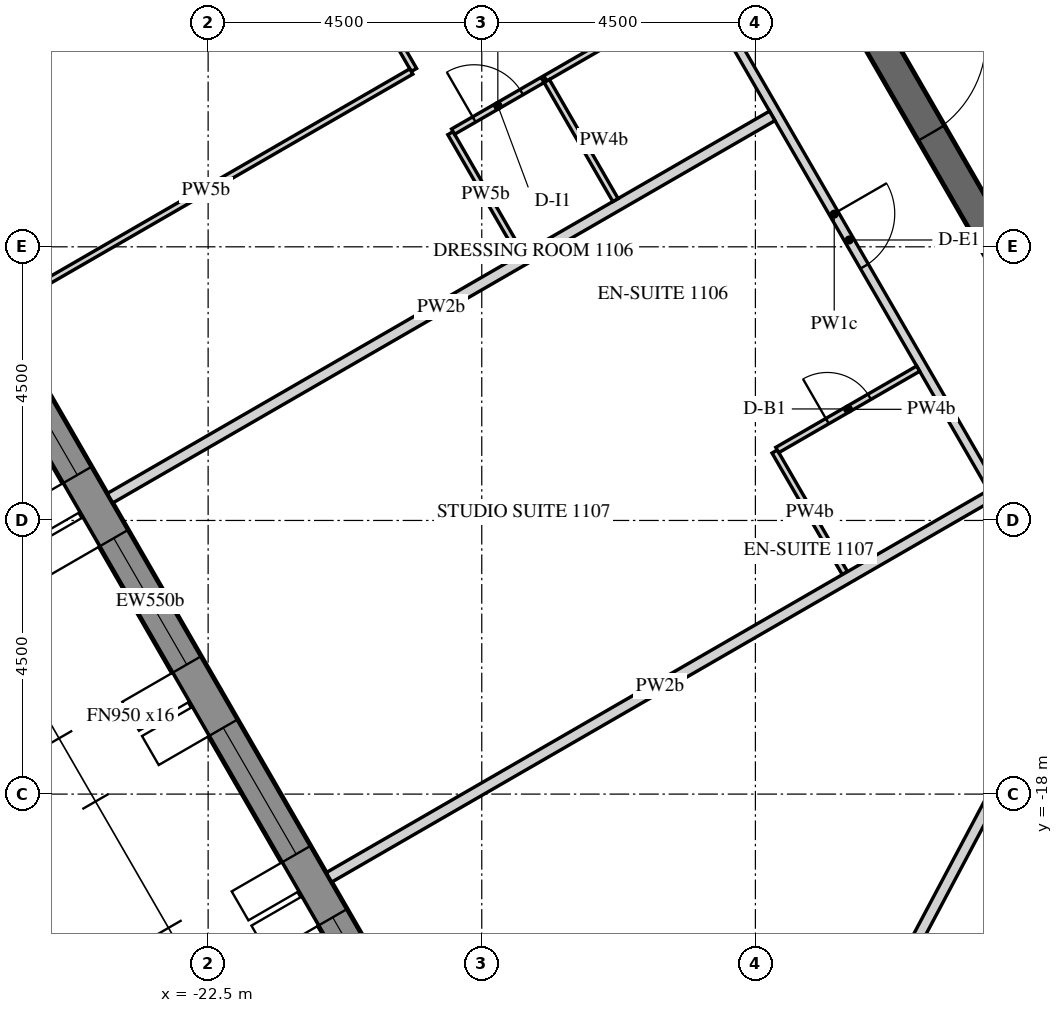
"""IFC4 building model, lengths in metres.
Left out: names, types, materials, properties, quantities, classifications, styles, units other than length and angle.
Written with IfcOpenShell. Run it as: python <this file> out.ifc"""

import sys

from ifc_helpers import new_model, si_unit, direction, frame, frame_2d, origin, place, context, subcontext, project, spatial, polyline, rectangle, outline, extrude, element, fill, save


model = new_model("IFC4")
c1 = context("Model", 3, precision=1e-05, world=origin(), true_north=direction((0.0, 1.0)))
c2 = subcontext(c1, "Body", "Model", "MODEL_VIEW")
j1 = project(units=[si_unit("LENGTHUNIT", "METRE"), si_unit("PLANEANGLEUNIT", "RADIAN")], contexts=[c1])
p1 = place(None, origin())
s1 = spatial("IfcSite", under=j1, at=p1, CompositionType="ELEMENT")
p2 = place(p1, origin())
s2 = spatial("IfcBuilding", under=s1, at=p2, CompositionType="ELEMENT")
p3 = place(p2, frame((0.0, 0.0, 152.7)))
s3 = spatial("IfcBuildingStorey", under=s2, at=p3, CompositionType="ELEMENT", Elevation=152.7)
p4 = place(p3, frame((-30.391, -2.811, 0.0), z_axis=(0.0, 0.0, 1.0), x_axis=(0.499998569178, -0.866026229868, 0.0)))
e1 = element("IfcWall", 1, at=p4, inside=s3, PredefinedType="SOLIDWALL", context=c2, shape_type="SweptSolid", body=[
    extrude(outline(polyline([(-0.022, -0.275), (27.783, -0.275), (27.732, 0.275), (0.022, 0.275), (-0.022, -0.275)])), origin(), (0.0, 0.0, 1.0), 3.75),
])
p5 = place(p4, frame((1.879, 0.0, 0.9)))
e2 = element("IfcOpeningElement", 2, at=p5, cuts=e1, PredefinedType="OPENING", context=c2, shape_type="SweptSolid", body=[
    extrude(rectangle(XDim=2.4, YDim=2.4, at=frame_2d((1.2, 1.2))), frame((0.0, 0.285, 0.0), z_axis=(0.0, -1.0, 0.0), x_axis=(1.0, 0.0, 0.0)), (0.0, 0.0, 1.0), 0.57),
])
p6 = place(p4, frame((5.479, 0.0, 0.9)))
e3 = element("IfcOpeningElement", 3, at=p6, cuts=e1, PredefinedType="OPENING", context=c2, shape_type="SweptSolid", body=[
    extrude(rectangle(XDim=2.4, YDim=2.4, at=frame_2d((1.2, 1.2))), frame((0.0, 0.285, 0.0), z_axis=(0.0, -1.0, 0.0), x_axis=(1.0, 0.0, 0.0)), (0.0, 0.0, 1.0), 0.57),
])
p7 = place(p4, frame((9.079, 0.0, 0.9)))
e4 = element("IfcOpeningElement", 4, at=p7, cuts=e1, PredefinedType="OPENING", context=c2, shape_type="SweptSolid", body=[
    extrude(rectangle(XDim=2.4, YDim=2.4, at=frame_2d((1.2, 1.2))), frame((0.0, 0.285, 0.0), z_axis=(0.0, -1.0, 0.0), x_axis=(1.0, 0.0, 0.0)), (0.0, 0.0, 1.0), 0.57),
])
p8 = place(p4, frame((12.679, 0.0, 0.9)))
e5 = element("IfcOpeningElement", 5, at=p8, cuts=e1, PredefinedType="OPENING", context=c2, shape_type="SweptSolid", body=[
    extrude(rectangle(XDim=2.4, YDim=2.4, at=frame_2d((1.2, 1.2))), frame((0.0, 0.285, 0.0), z_axis=(0.0, -1.0, 0.0), x_axis=(1.0, 0.0, 0.0)), (0.0, 0.0, 1.0), 0.57),
])
p9 = place(p4, frame((16.279, 0.0, 0.9)))
e6 = element("IfcOpeningElement", 6, at=p9, cuts=e1, PredefinedType="OPENING", context=c2, shape_type="SweptSolid", body=[
    extrude(rectangle(XDim=2.4, YDim=2.4, at=frame_2d((1.2, 1.2))), frame((0.0, 0.285, 0.0), z_axis=(0.0, -1.0, 0.0), x_axis=(1.0, 0.0, 0.0)), (0.0, 0.0, 1.0), 0.57),
])
p10 = place(p4, frame((19.879, 0.0, 0.9)))
e7 = element("IfcOpeningElement", 7, at=p10, cuts=e1, PredefinedType="OPENING", context=c2, shape_type="SweptSolid", body=[
    extrude(rectangle(XDim=2.4, YDim=2.4, at=frame_2d((1.2, 1.2))), frame((0.0, 0.285, 0.0), z_axis=(0.0, -1.0, 0.0), x_axis=(1.0, 0.0, 0.0)), (0.0, 0.0, 1.0), 0.57),
])
p11 = place(p4, frame((23.479, 0.0, 0.9)))
e8 = element("IfcOpeningElement", 8, at=p11, cuts=e1, PredefinedType="OPENING", context=c2, shape_type="SweptSolid", body=[
    extrude(rectangle(XDim=2.4, YDim=2.4, at=frame_2d((1.2, 1.2))), frame((0.0, 0.285, 0.0), z_axis=(0.0, -1.0, 0.0), x_axis=(1.0, 0.0, 0.0)), (0.0, 0.0, 1.0), 0.57),
])
p12 = place(p3, frame((-14.722, 0.0, 0.0), z_axis=(0.0, 0.0, 1.0), x_axis=(0.50000571537, -0.866022103989, 0.0)))
e9 = element("IfcWall", 9, at=p12, inside=s3, PredefinedType="SHEAR", context=c2, shape_type="SweptSolid", body=[
    extrude(outline(polyline([(-0.144, -0.25), (14.867, -0.25), (14.578, 0.25), (0.144, 0.25), (-0.144, -0.25)])), origin(), (0.0, 0.0, 1.0), 3.75),
])
p13 = place(p12, frame((6.432, 0.0, 0.0)))
e10 = element("IfcOpeningElement", 10, at=p13, cuts=e9, PredefinedType="OPENING", context=c2, shape_type="SweptSolid", body=[
    extrude(rectangle(XDim=1.8, YDim=2.4, at=frame_2d((0.9, 1.2))), frame((0.0, 0.26, 0.0), z_axis=(0.0, -1.0, 0.0), x_axis=(1.0, 0.0, 0.0)), (0.0, 0.0, 1.0), 0.52),
])
p14 = place(p3, frame((-11.345, 0.0, 0.0), z_axis=(0.0, 0.0, 1.0), x_axis=(0.499995046907, -0.866028263435, 0.0)))
e11 = element("IfcWall", 11, at=p14, inside=s3, PredefinedType="SHEAR", context=c2, shape_type="SweptSolid", body=[
    extrude(outline(polyline([(-0.101, -0.175), (11.446, -0.175), (11.244, 0.175), (0.101, 0.175), (-0.101, -0.175)])), origin(), (0.0, 0.0, 1.0), 3.75),
])
p15 = place(p14, frame((4.744, 0.0, 0.0)))
e12 = element("IfcOpeningElement", 12, at=p15, cuts=e11, PredefinedType="OPENING", context=c2, shape_type="SweptSolid", body=[
    extrude(rectangle(XDim=1.8, YDim=2.4, at=frame_2d((0.9, 1.2))), frame((0.0, 0.185, 0.0), z_axis=(0.0, -1.0, 0.0), x_axis=(1.0, 0.0, 0.0)), (0.0, 0.0, 1.0), 0.37),
])
p16 = place(p3, frame((-15.863, -2.125, 0.0), z_axis=(0.0, 0.0, 1.0), x_axis=(0.500008833422, -0.866020303746, 0.0)))
e13 = element("IfcWall", 13, at=p16, inside=s3, PredefinedType="PARTITIONING", context=c2, shape_type="SweptSolid", body=[
    extrude(rectangle(XDim=14.636, YDim=0.15, at=frame_2d((7.318, 0.0))), origin(), (0.0, 0.0, 1.0), 2.823),
])
p17 = place(p16, frame((0.961, 0.0, 0.0)))
e14 = element("IfcOpeningElement", 14, at=p17, cuts=e13, PredefinedType="OPENING", context=c2, shape_type="SweptSolid", body=[
    extrude(rectangle(XDim=1.0, YDim=2.1, at=frame_2d((0.5, 1.05))), frame((0.0, 0.085, 0.0), z_axis=(0.0, -1.0, 0.0), x_axis=(1.0, 0.0, 0.0)), (0.0, 0.0, 1.0), 0.17),
])
p18 = place(p16, frame((7.309, 0.0, 0.0)))
e15 = element("IfcOpeningElement", 15, at=p18, cuts=e13, PredefinedType="OPENING", context=c2, shape_type="SweptSolid", body=[
    extrude(rectangle(XDim=1.0, YDim=2.1, at=frame_2d((0.5, 1.05))), frame((0.0, 0.085, 0.0), z_axis=(0.0, -1.0, 0.0), x_axis=(1.0, 0.0, 0.0)), (0.0, 0.0, 1.0), 0.17),
])
p19 = place(p16, frame((13.486, 0.0, 0.0)))
e16 = element("IfcOpeningElement", 16, at=p19, cuts=e13, PredefinedType="OPENING", context=c2, shape_type="SweptSolid", body=[
    extrude(rectangle(XDim=1.0, YDim=2.1, at=frame_2d((0.5, 1.05))), frame((0.0, 0.085, 0.0), z_axis=(0.0, -1.0, 0.0), x_axis=(1.0, 0.0, 0.0)), (0.0, 0.0, 1.0), 0.17),
])
p20 = place(p3, frame((-16.956, -6.231, 0.0), z_axis=(0.0, 0.0, 1.0), x_axis=(0.866046596414, 0.499963291492, 0.0)))
e17 = element("IfcWall", 17, at=p20, inside=s3, PredefinedType="PARTITIONING", context=c2, shape_type="SweptSolid", body=[
    extrude(rectangle(XDim=2.925, YDim=0.1, at=frame_2d((1.462, 0.0))), origin(), (0.0, 0.0, 1.0), 2.823),
])
p21 = place(p20, frame((1.1, 0.0, 0.0)))
e18 = element("IfcOpeningElement", 18, at=p21, cuts=e17, PredefinedType="OPENING", context=c2, shape_type="SweptSolid", body=[
    extrude(rectangle(XDim=0.8, YDim=2.1, at=frame_2d((0.4, 1.05))), frame((0.0, 0.06, 0.0), z_axis=(0.0, -1.0, 0.0), x_axis=(1.0, 0.0, 0.0)), (0.0, 0.0, 1.0), 0.12),
])
p22 = place(p3, frame((-17.36, -9.131, 0.0), z_axis=(0.0, 0.0, 1.0), x_axis=(-0.500015210774, 0.866016621662, 0.0)))
e19 = element("IfcWall", 19, at=p22, inside=s3, PredefinedType="PARTITIONING", context=c2, shape_type="SweptSolid", body=[
    extrude(rectangle(XDim=2.31, YDim=0.1, at=frame_2d((1.155, 0.0))), origin(), (0.0, 0.0, 1.0), 2.823),
])
p23 = place(p3, frame((-18.472, -7.106, 0.0), z_axis=(0.0, 0.0, 1.0), x_axis=(0.866087547558, 0.499892348375, 0.0)))
e20 = element("IfcWall", 20, at=p23, inside=s3, PredefinedType="PARTITIONING", context=c2, shape_type="SweptSolid", body=[
    extrude(rectangle(XDim=1.7, YDim=0.1, at=frame_2d((0.85, 0.0))), origin(), (0.0, 0.0, 1.0), 2.823),
])
p24 = place(p23, frame((0.4, 0.0, 0.0)))
e21 = element("IfcOpeningElement", 21, at=p24, cuts=e20, PredefinedType="OPENING", context=c2, shape_type="SweptSolid", body=[
    extrude(rectangle(XDim=0.9, YDim=2.1, at=frame_2d((0.45, 1.05))), frame((0.0, 0.06, 0.0), z_axis=(0.0, -1.0, 0.0), x_axis=(1.0, 0.0, 0.0)), (0.0, 0.0, 1.0), 0.12),
])
p25 = place(p3, frame((-21.405, -2.125, 0.0), z_axis=(0.0, 0.0, 1.0), x_axis=(0.49999161165, -0.866030246746, 0.0)))
e22 = element("IfcWall", 22, at=p25, inside=s3, PredefinedType="PARTITIONING", context=c2, shape_type="SweptSolid", body=[
    extrude(rectangle(XDim=4.58, YDim=0.1, at=frame_2d((2.29, 0.0))), origin(), (0.0, 0.0, 1.0), 2.823),
])
p26 = place(p25, frame((0.53, 0.0, 0.0)))
e23 = element("IfcOpeningElement", 23, at=p26, cuts=e22, PredefinedType="OPENING", context=c2, shape_type="SweptSolid", body=[
    extrude(rectangle(XDim=0.9, YDim=2.1, at=frame_2d((0.45, 1.05))), frame((0.0, 0.06, 0.0), z_axis=(0.0, -1.0, 0.0), x_axis=(1.0, 0.0, 0.0)), (0.0, 0.0, 1.0), 0.12),
])
p27 = place(p3, frame((-19.158, -6.116, 0.0), z_axis=(0.0, 0.0, 1.0), x_axis=(-0.866021400173, -0.500006934395, 0.0)))
e24 = element("IfcWall", 24, at=p27, inside=s3, PredefinedType="PARTITIONING", context=c2, shape_type="SweptSolid", body=[
    extrude(rectangle(XDim=7.8, YDim=0.1, at=frame_2d((3.9, 0.0))), origin(), (0.0, 0.0, 1.0), 2.823),
])
p28 = place(p3, frame((-24.114, -13.134, 0.0), z_axis=(0.0, 0.0, 1.0), x_axis=(0.866024255907, 0.500001988177, 0.0)))
e25 = element("IfcWall", 25, at=p28, inside=s3, PredefinedType="PARTITIONING", context=c2, shape_type="SweptSolid", body=[
    extrude(rectangle(XDim=12.575, YDim=0.18, at=frame_2d((6.288, 0.0))), origin(), (0.0, 0.0, 1.0), 2.823),
])
p29 = place(p3, frame((-16.931, -6.274, 0.0), z_axis=(0.0, 0.0, 1.0), x_axis=(0.500077800282, -0.865980481111, 0.0)))
e26 = element("IfcWall", 26, at=p29, inside=s3, PredefinedType="PARTITIONING", context=c2, shape_type="SweptSolid", body=[
    extrude(rectangle(XDim=2.26, YDim=0.1, at=frame_2d((1.13, 0.0))), origin(), (0.0, 0.0, 1.0), 2.823),
])
p30 = place(p3, frame((-12.028, -14.367, 0.0), z_axis=(0.0, 0.0, 1.0), x_axis=(-0.500015210774, 0.866016621662, 0.0)))
e27 = element("IfcWall", 27, at=p30, inside=s3, PredefinedType="PARTITIONING", context=c2, shape_type="SweptSolid", body=[
    extrude(rectangle(XDim=2.31, YDim=0.1, at=frame_2d((1.155, 0.0))), origin(), (0.0, 0.0, 1.0), 2.823),
])
p31 = place(p3, frame((-13.14, -12.341, 0.0), z_axis=(0.0, 0.0, 1.0), x_axis=(0.86604424267, 0.499967368674, 0.0)))
e28 = element("IfcWall", 28, at=p31, inside=s3, PredefinedType="PARTITIONING", context=c2, shape_type="SweptSolid", body=[
    extrude(rectangle(XDim=2.675, YDim=0.1, at=frame_2d((1.337, 0.0))), origin(), (0.0, 0.0, 1.0), 2.823),
])
p32 = place(p31, frame((0.95, 0.0, 0.0)))
e29 = element("IfcOpeningElement", 29, at=p32, cuts=e28, PredefinedType="OPENING", context=c2, shape_type="SweptSolid", body=[
    extrude(rectangle(XDim=0.8, YDim=2.1, at=frame_2d((0.4, 1.05))), frame((0.0, 0.06, 0.0), z_axis=(0.0, -1.0, 0.0), x_axis=(1.0, 0.0, 0.0)), (0.0, 0.0, 1.0), 0.12),
])
p33 = place(p3, frame((-20.513, -19.37, 0.0), z_axis=(0.0, 0.0, 1.0), x_axis=(0.866019402111, 0.500010395058, 0.0)))
e30 = element("IfcWall", 30, at=p33, inside=s3, PredefinedType="PARTITIONING", context=c2, shape_type="SweptSolid", body=[
    extrude(rectangle(XDim=12.575, YDim=0.18, at=frame_2d((6.288, 0.0))), origin(), (0.0, 0.0, 1.0), 2.823),
])
p34 = place(p3, frame((-14.876, -27.977, 0.0), z_axis=(0.0, 0.0, 1.0), x_axis=(0.469475175214, 0.882945672088, 0.0)))
e31 = element("IfcWall", 31, at=p34, inside=s3, PredefinedType="PARTITIONING", context=c2, shape_type="SweptSolid", body=[
    extrude(rectangle(XDim=14.839, YDim=0.18, at=frame_2d((7.419, 0.0))), origin(), (0.0, 0.0, 1.0), 2.823),
])
p35 = place(p7, frame((0.0, 0.205, 0.0)))
e32 = element("IfcWindow", 32, at=p35, inside=s3, PartitioningType="DOUBLE_PANEL_VERTICAL", PredefinedType="WINDOW", context=c2, shape_type="SweptSolid", body=[
    extrude(rectangle(XDim=2.4, YDim=2.4, at=frame_2d((1.2, 1.2))), frame((0.0, 0.03, 0.0), z_axis=(0.0, -1.0, 0.0), x_axis=(1.0, 0.0, 0.0)), (0.0, 0.0, 1.0), 0.06),
])
fill(e4, e32)
p36 = place(p8, frame((0.0, 0.205, 0.0)))
e33 = element("IfcWindow", 33, at=p36, inside=s3, PartitioningType="DOUBLE_PANEL_VERTICAL", PredefinedType="WINDOW", context=c2, shape_type="SweptSolid", body=[
    extrude(rectangle(XDim=2.4, YDim=2.4, at=frame_2d((1.2, 1.2))), frame((0.0, 0.03, 0.0), z_axis=(0.0, -1.0, 0.0), x_axis=(1.0, 0.0, 0.0)), (0.0, 0.0, 1.0), 0.06),
])
fill(e5, e33)
p37 = place(p9, frame((0.0, 0.205, 0.0)))
e34 = element("IfcWindow", 34, at=p37, inside=s3, PartitioningType="DOUBLE_PANEL_VERTICAL", PredefinedType="WINDOW", context=c2, shape_type="SweptSolid", body=[
    extrude(rectangle(XDim=2.4, YDim=2.4, at=frame_2d((1.2, 1.2))), frame((0.0, 0.03, 0.0), z_axis=(0.0, -1.0, 0.0), x_axis=(1.0, 0.0, 0.0)), (0.0, 0.0, 1.0), 0.06),
])
fill(e6, e34)
p38 = place(p10, frame((0.0, 0.205, 0.0)))
e35 = element("IfcWindow", 35, at=p38, inside=s3, PartitioningType="DOUBLE_PANEL_VERTICAL", PredefinedType="WINDOW", context=c2, shape_type="SweptSolid", body=[
    extrude(rectangle(XDim=2.4, YDim=2.4, at=frame_2d((1.2, 1.2))), frame((0.0, 0.03, 0.0), z_axis=(0.0, -1.0, 0.0), x_axis=(1.0, 0.0, 0.0)), (0.0, 0.0, 1.0), 0.06),
])
fill(e7, e35)
p39 = place(p13, origin())
e36 = element("IfcDoor", 36, at=p39, inside=s3, OperationType="DOUBLE_DOOR_SINGLE_SWING", PredefinedType="DOOR", context=c2, shape_type="SweptSolid", body=[
    extrude(rectangle(XDim=1.8, YDim=2.4, at=frame_2d((0.9, 1.2))), frame((0.0, 0.025, 0.0), z_axis=(0.0, -1.0, 0.0), x_axis=(1.0, 0.0, 0.0)), (0.0, 0.0, 1.0), 0.05),
])
fill(e10, e36)
p40 = place(p24, origin())
e37 = element("IfcDoor", 37, at=p40, inside=s3, OperationType="SINGLE_SWING_RIGHT", PredefinedType="DOOR", context=c2, shape_type="SweptSolid", body=[
    extrude(rectangle(XDim=0.9, YDim=2.1, at=frame_2d((0.45, 1.05))), frame((0.0, 0.025, 0.0), z_axis=(0.0, -1.0, 0.0), x_axis=(1.0, 0.0, 0.0)), (0.0, 0.0, 1.0), 0.05),
])
fill(e21, e37)
p41 = place(p18, origin())
e38 = element("IfcDoor", 38, at=p41, inside=s3, OperationType="SINGLE_SWING_LEFT", PredefinedType="DOOR", context=c2, shape_type="SweptSolid", body=[
    extrude(rectangle(XDim=1.0, YDim=2.1, at=frame_2d((0.5, 1.05))), frame((0.0, 0.025, 0.0), z_axis=(0.0, -1.0, 0.0), x_axis=(1.0, 0.0, 0.0)), (0.0, 0.0, 1.0), 0.05),
])
fill(e15, e38)
p42 = place(p32, origin())
e39 = element("IfcDoor", 39, at=p42, inside=s3, OperationType="SINGLE_SWING_RIGHT", PredefinedType="DOOR", context=c2, shape_type="SweptSolid", body=[
    extrude(rectangle(XDim=0.8, YDim=2.1, at=frame_2d((0.4, 1.05))), frame((0.0, 0.025, 0.0), z_axis=(0.0, -1.0, 0.0), x_axis=(1.0, 0.0, 0.0)), (0.0, 0.0, 1.0), 0.05),
])
fill(e29, e39)
save(model, sys.argv[1])
